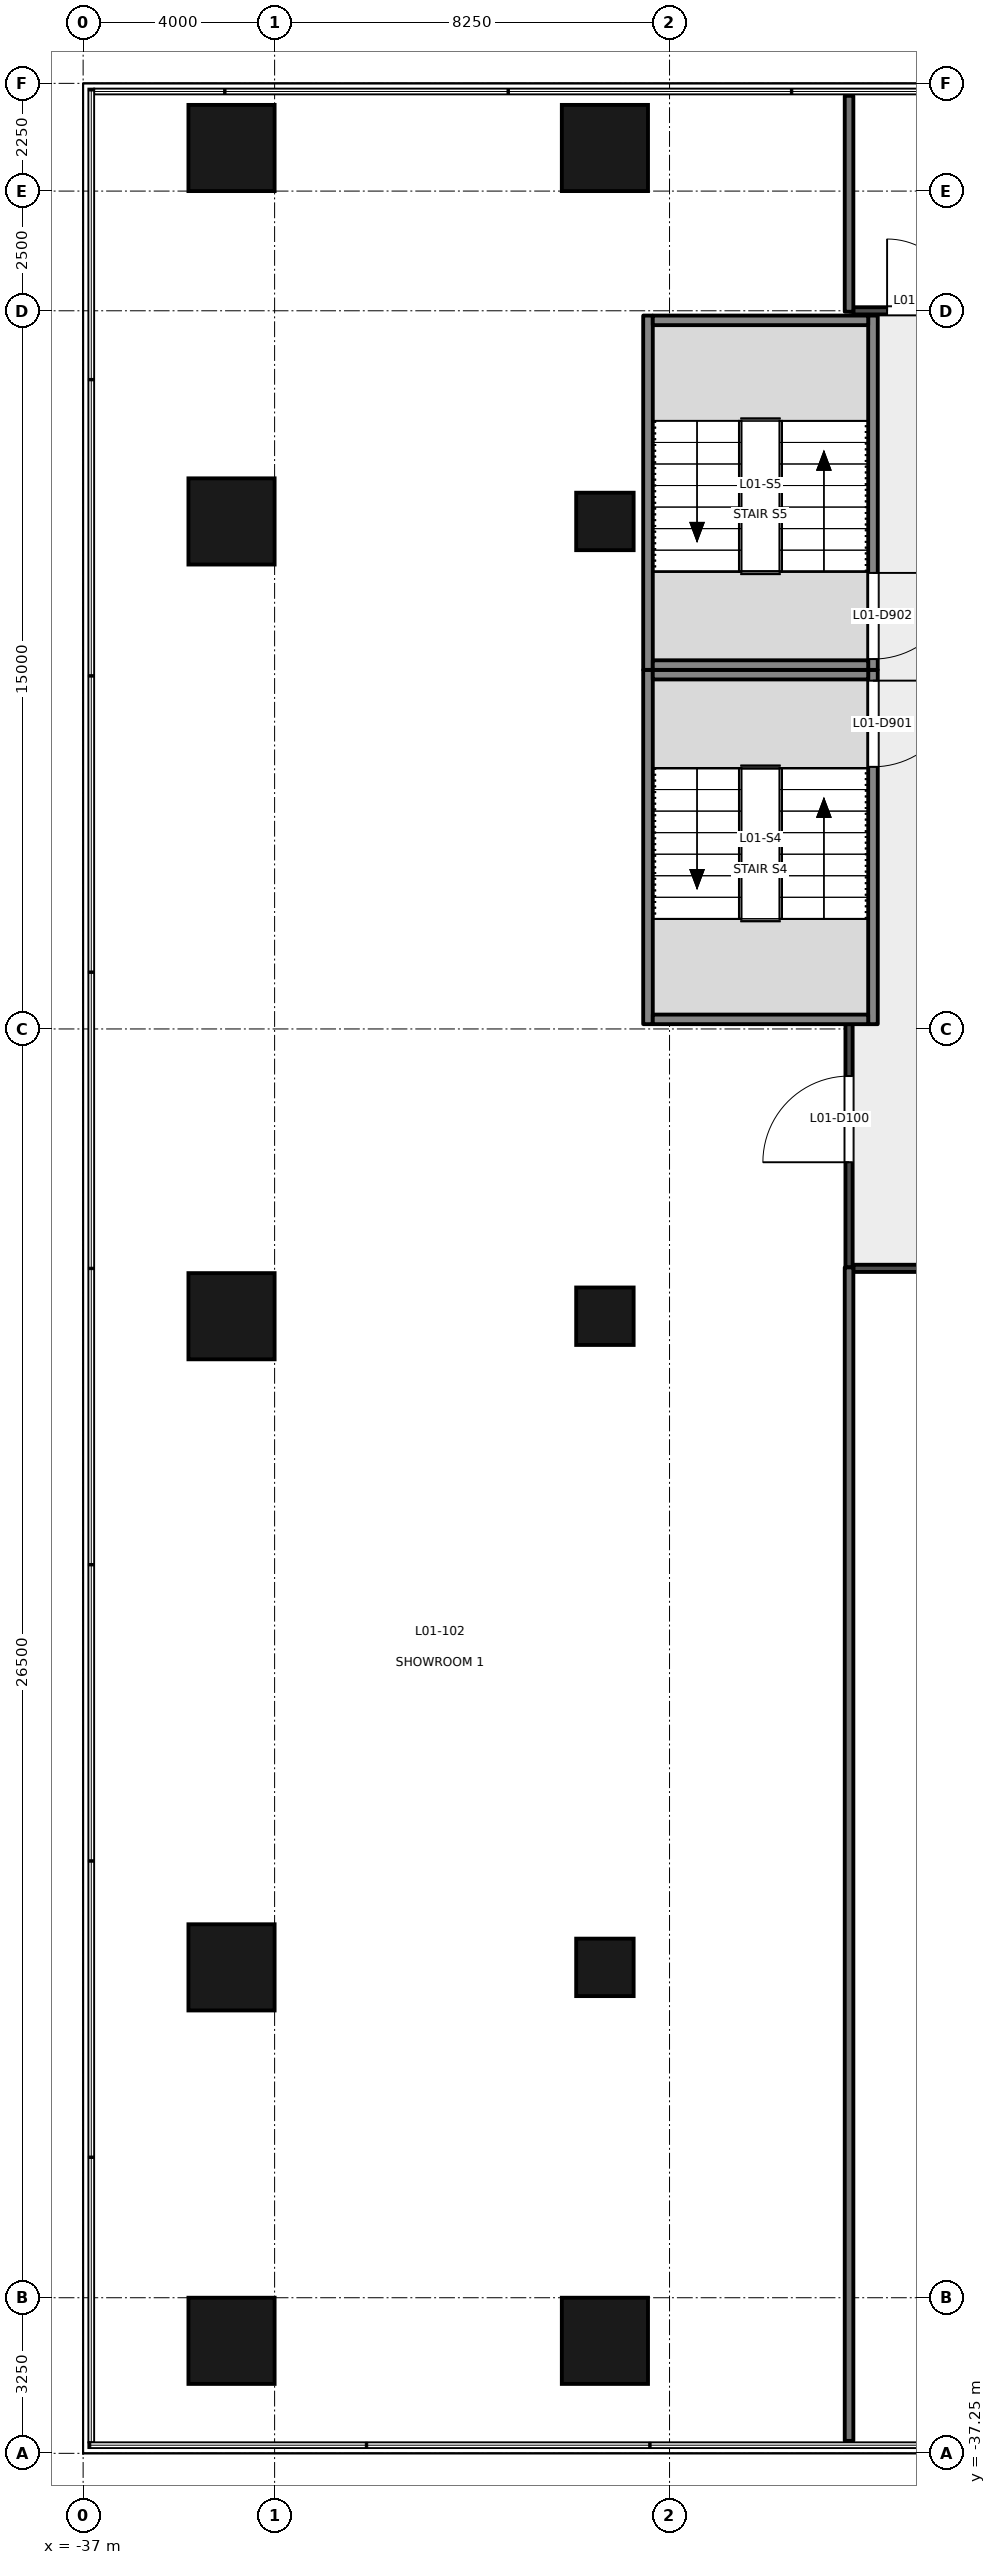
"""IFC4 building model, lengths in metres.
Left out: names, types, materials, properties, quantities, classifications, styles, units other than length and angle.
Written with IfcOpenShell. Run it as: python <this file> out.ifc"""

import sys

from ifc_helpers import new_model, si_unit, direction, frame, frame_2d, origin, origin_2d, place, context, subcontext, project, spatial, rectangle, extrude, element, fill, save


model = new_model("IFC4")
c1 = context("Model", 3, precision=1e-05, world=origin(), true_north=direction((0.0, 1.0)))
c2 = subcontext(c1, "Body", "Model", "MODEL_VIEW")
j1 = project(units=[si_unit("LENGTHUNIT", "METRE"), si_unit("PLANEANGLEUNIT", "RADIAN")], contexts=[c1])
p1 = place(None, origin())
s1 = spatial("IfcSite", under=j1, at=p1, CompositionType="ELEMENT")
p2 = place(p1, origin())
s2 = spatial("IfcBuilding", under=s1, at=p2, CompositionType="ELEMENT")
p3 = place(p2, frame((0.0, 0.0, 7.2)))
s3 = spatial("IfcBuildingStorey", under=s2, at=p3, CompositionType="ELEMENT", Elevation=7.2)
for number, where, z_axis, x_axis in (
    (1, (-33.9, -34.9, -0.2), (0.0, 0.0, 1.0), (1.0, 0.0, 0.0)),
    (2, (-33.9, 10.9, -0.2), (0.0, 0.0, 1.0), (1.0, 0.0, 0.0)),
    (3, (-26.1, -34.9, -0.2), (0.0, 0.0, 1.0), (1.0, 0.0, 0.0)),
    (4, (-33.9, -27.1, -0.2), (0.0, 0.0, 1.0), (0.0, 1.0, 0.0)),
    (5, (-33.9, -13.5, -0.2), (0.0, 0.0, 1.0), (0.0, 1.0, 0.0)),
    (6, (-33.9, 3.1, -0.2), (0.0, 0.0, 1.0), (0.0, 1.0, 0.0)),
    (7, (-26.1, 10.9, -0.2), (0.0, 0.0, 1.0), (1.0, 0.0, 0.0)),
):
    element("IfcColumn", number, at=place(p3, frame(where, z_axis=z_axis, x_axis=x_axis)), inside=s3, PredefinedType="COLUMN", context=c2, shape_type="SweptSolid", body=[
        extrude(rectangle(XDim=1.8, YDim=1.8, at=origin_2d()), origin(), (0.0, 0.0, 1.0), 5.4),
    ])
for number, where, z_axis, x_axis in (
    (8, (-26.1, -27.1, -0.2), (0.0, 0.0, 1.0), (1.0, 0.0, 0.0)),
    (9, (-26.1, -13.5, -0.2), (0.0, 0.0, 1.0), (1.0, 0.0, 0.0)),
    (10, (-26.1, 3.1, -0.2), (0.0, 0.0, 1.0), (1.0, 0.0, 0.0)),
):
    element("IfcColumn", number, at=place(p3, frame(where, z_axis=z_axis, x_axis=x_axis)), inside=s3, PredefinedType="COLUMN", context=c2, shape_type="SweptSolid", body=[
        extrude(rectangle(XDim=1.2, YDim=1.2, at=origin_2d()), origin(), (0.0, 0.0, 1.0), 5.4),
    ])
p4 = place(p3, frame((-20.5, 0.0, -0.2), z_axis=(0.0, 0.0, 1.0), x_axis=(0.0, -1.0, 0.0)))
e11 = element("IfcWall", 11, at=p4, inside=s3, PredefinedType="SHEAR", context=c2, shape_type="SweptSolid", body=[
    extrude(rectangle(XDim=7.4, YDim=0.2, at=frame_2d((3.7, 0.0))), origin(), (0.0, 0.0, 1.0), 5.4),
])
p5 = place(p4, frame((0.225, 0.0, 0.2)))
e12 = element("IfcOpeningElement", 12, at=p5, cuts=e11, PredefinedType="OPENING", context=c2, shape_type="SweptSolid", body=[
    extrude(rectangle(XDim=1.8, YDim=2.1, at=frame_2d((0.9, 1.05))), frame((0.0, 0.111, 0.0), z_axis=(0.0, -1.0, 0.0), x_axis=(1.0, 0.0, 0.0)), (0.0, 0.0, 1.0), 0.221),
])
p6 = place(p3, frame((-25.2, -7.4, -0.2), z_axis=(0.0, 0.0, 1.0), x_axis=(0.0, 1.0, 0.0)))
e13 = element("IfcWall", 13, at=p6, inside=s3, PredefinedType="SHEAR", context=c2, shape_type="SweptSolid", body=[
    extrude(rectangle(XDim=7.4, YDim=0.2, at=frame_2d((3.7, 0.0))), origin(), (0.0, 0.0, 1.0), 5.4),
])
for number, where, z_axis, x_axis in (
    (14, (-25.1, -0.1, -0.2), (0.0, 0.0, 1.0), (1.0, 0.0, 0.0)),
    (15, (-25.1, -7.3, -0.2), (0.0, 0.0, 1.0), (1.0, 0.0, 0.0)),
):
    element("IfcWall", number, at=place(p3, frame(where, z_axis=z_axis, x_axis=x_axis)), inside=s3, PredefinedType="SHEAR", context=c2, shape_type="SweptSolid", body=[
        extrude(rectangle(XDim=4.5, YDim=0.2, at=frame_2d((2.25, 0.0))), origin(), (0.0, 0.0, 1.0), 5.4),
    ])
p7 = place(p3, frame((-20.5, 7.4, -0.2), z_axis=(0.0, 0.0, 1.0), x_axis=(0.0, -1.0, 0.0)))
e16 = element("IfcWall", 16, at=p7, inside=s3, PredefinedType="SHEAR", context=c2, shape_type="SweptSolid", body=[
    extrude(rectangle(XDim=7.4, YDim=0.2, at=frame_2d((3.7, 0.0))), origin(), (0.0, 0.0, 1.0), 5.4),
])
p8 = place(p7, frame((5.375, 0.0, 0.2)))
e17 = element("IfcOpeningElement", 17, at=p8, cuts=e16, PredefinedType="OPENING", context=c2, shape_type="SweptSolid", body=[
    extrude(rectangle(XDim=1.8, YDim=2.1, at=frame_2d((0.9, 1.05))), frame((0.0, 0.111, 0.0), z_axis=(0.0, -1.0, 0.0), x_axis=(1.0, 0.0, 0.0)), (0.0, 0.0, 1.0), 0.221),
])
p9 = place(p3, frame((-25.2, 0.0, -0.2), z_axis=(0.0, 0.0, 1.0), x_axis=(0.0, 1.0, 0.0)))
e18 = element("IfcWall", 18, at=p9, inside=s3, PredefinedType="SHEAR", context=c2, shape_type="SweptSolid", body=[
    extrude(rectangle(XDim=7.4, YDim=0.2, at=frame_2d((3.7, 0.0))), origin(), (0.0, 0.0, 1.0), 5.4),
])
for number, where, z_axis, x_axis in (
    (19, (-25.1, 7.3, -0.2), (0.0, 0.0, 1.0), (1.0, 0.0, 0.0)),
    (20, (-25.1, 0.1, -0.2), (0.0, 0.0, 1.0), (1.0, 0.0, 0.0)),
):
    element("IfcWall", number, at=place(p3, frame(where, z_axis=z_axis, x_axis=x_axis)), inside=s3, PredefinedType="SHEAR", context=c2, shape_type="SweptSolid", body=[
        extrude(rectangle(XDim=4.5, YDim=0.2, at=frame_2d((2.25, 0.0))), origin(), (0.0, 0.0, 1.0), 5.4),
    ])
p10 = place(p3, frame((-21.0, -12.48, 0.0), z_axis=(0.0, 0.0, 1.0), x_axis=(0.0, 1.0, 0.0)))
e21 = element("IfcWall", 21, at=p10, inside=s3, PredefinedType="PARTITIONING", context=c2, shape_type="SweptSolid", body=[
    extrude(rectangle(XDim=5.08, YDim=0.15, at=frame_2d((2.54, 0.0))), origin(), (0.0, 0.0, 1.0), 5.2),
])
p11 = place(p10, frame((2.196, 0.0, 0.0)))
e22 = element("IfcOpeningElement", 22, at=p11, cuts=e21, PredefinedType="OPENING", context=c2, shape_type="SweptSolid", body=[
    extrude(rectangle(XDim=1.8, YDim=2.1, at=frame_2d((0.9, 1.05))), frame((0.0, 0.085, 0.0), z_axis=(0.0, -1.0, 0.0), x_axis=(1.0, 0.0, 0.0)), (0.0, 0.0, 1.0), 0.171),
])
p12 = place(p3, frame((-10.45, -12.5, 0.0), z_axis=(0.0, 0.0, 1.0), x_axis=(-1.0, 0.0, 0.0)))
e23 = element("IfcWall", 23, at=p12, inside=s3, PredefinedType="PARTITIONING", context=c2, shape_type="SweptSolid", body=[
    extrude(rectangle(XDim=10.46, YDim=0.15, at=frame_2d((5.23, 0.0))), origin(), (0.0, 0.0, 1.0), 3.8),
])
p13 = place(p12, frame((4.33, 0.0, 0.0)))
e24 = element("IfcOpeningElement", 24, at=p13, cuts=e23, PredefinedType="OPENING", context=c2, shape_type="SweptSolid", body=[
    extrude(rectangle(XDim=1.8, YDim=2.1, at=frame_2d((0.9, 1.05))), frame((0.0, 0.085, 0.0), z_axis=(0.0, -1.0, 0.0), x_axis=(1.0, 0.0, 0.0)), (0.0, 0.0, 1.0), 0.171),
])
p14 = place(p3, frame((-20.91, 7.499, 0.0), z_axis=(0.0, 0.0, 1.0), x_axis=(1.0, 0.0, 0.0)))
e25 = element("IfcWall", 25, at=p14, inside=s3, PredefinedType="PARTITIONING", context=c2, shape_type="SweptSolid", body=[
    extrude(rectangle(XDim=2.91, YDim=0.15, at=frame_2d((1.455, 0.0))), origin(), (0.0, 0.0, 1.0), 4.9),
])
p15 = place(p14, frame((0.705, 0.0, 0.0)))
e26 = element("IfcOpeningElement", 26, at=p15, cuts=e25, PredefinedType="OPENING", context=c2, shape_type="SweptSolid", body=[
    extrude(rectangle(XDim=1.5, YDim=2.1, at=frame_2d((0.75, 1.05))), frame((0.0, 0.085, 0.0), z_axis=(0.0, -1.0, 0.0), x_axis=(1.0, 0.0, 0.0)), (0.0, 0.0, 1.0), 0.171),
])
p16 = place(p3, frame((-21.0, -12.48, 0.0), z_axis=(0.0, 0.0, 1.0), x_axis=(0.0, -1.0, 0.0)))
e27 = element("IfcWall", 27, at=p16, inside=s3, PredefinedType="PARTITIONING", context=c2, shape_type="SweptSolid", body=[
    extrude(rectangle(XDim=24.51, YDim=0.18, at=frame_2d((12.255, 0.0))), origin(), (0.0, 0.0, 1.0), 4.2),
])
p17 = place(p3, frame((-21.0, 11.99, 0.0), z_axis=(0.0, 0.0, 1.0), x_axis=(0.0, -1.0, 0.0)))
e28 = element("IfcWall", 28, at=p17, inside=s3, PredefinedType="PARTITIONING", context=c2, shape_type="SweptSolid", body=[
    extrude(rectangle(XDim=4.51, YDim=0.18, at=frame_2d((2.255, 0.0))), origin(), (0.0, 0.0, 1.0), 4.2),
])
p18 = place(p5, origin())
e29 = element("IfcDoor", 29, at=p18, inside=s3, OperationType="DOUBLE_DOOR_SINGLE_SWING", PredefinedType="DOOR", context=c2, shape_type="SweptSolid", body=[
    extrude(rectangle(XDim=1.8, YDim=2.1, at=frame_2d((0.9, 1.05))), frame((0.0, 0.025, 0.0), z_axis=(0.0, -1.0, 0.0), x_axis=(1.0, 0.0, 0.0)), (0.0, 0.0, 1.0), 0.05),
])
fill(e12, e29)
p19 = place(p8, origin())
e30 = element("IfcDoor", 30, at=p19, inside=s3, OperationType="DOUBLE_DOOR_SINGLE_SWING", PredefinedType="DOOR", context=c2, shape_type="SweptSolid", body=[
    extrude(rectangle(XDim=1.8, YDim=2.1, at=frame_2d((0.9, 1.05))), frame((0.0, 0.025, 0.0), z_axis=(0.0, -1.0, 0.0), x_axis=(1.0, 0.0, 0.0)), (0.0, 0.0, 1.0), 0.05),
])
fill(e17, e30)
p20 = place(p11, origin())
e31 = element("IfcDoor", 31, at=p20, inside=s3, OperationType="DOUBLE_DOOR_SINGLE_SWING", PredefinedType="DOOR", context=c2, shape_type="SweptSolid", body=[
    extrude(rectangle(XDim=1.8, YDim=2.1, at=frame_2d((0.9, 1.05))), frame((0.0, 0.025, 0.0), z_axis=(0.0, -1.0, 0.0), x_axis=(1.0, 0.0, 0.0)), (0.0, 0.0, 1.0), 0.05),
])
fill(e22, e31)
p21 = place(p15, origin())
e32 = element("IfcDoor", 32, at=p21, inside=s3, OperationType="DOUBLE_DOOR_SINGLE_SWING", PredefinedType="DOOR", context=c2, shape_type="SweptSolid", body=[
    extrude(rectangle(XDim=1.5, YDim=2.1, at=frame_2d((0.75, 1.05))), frame((0.0, 0.025, 0.0), z_axis=(0.0, -1.0, 0.0), x_axis=(1.0, 0.0, 0.0)), (0.0, 0.0, 1.0), 0.05),
])
fill(e26, e32)
save(model, sys.argv[1])
